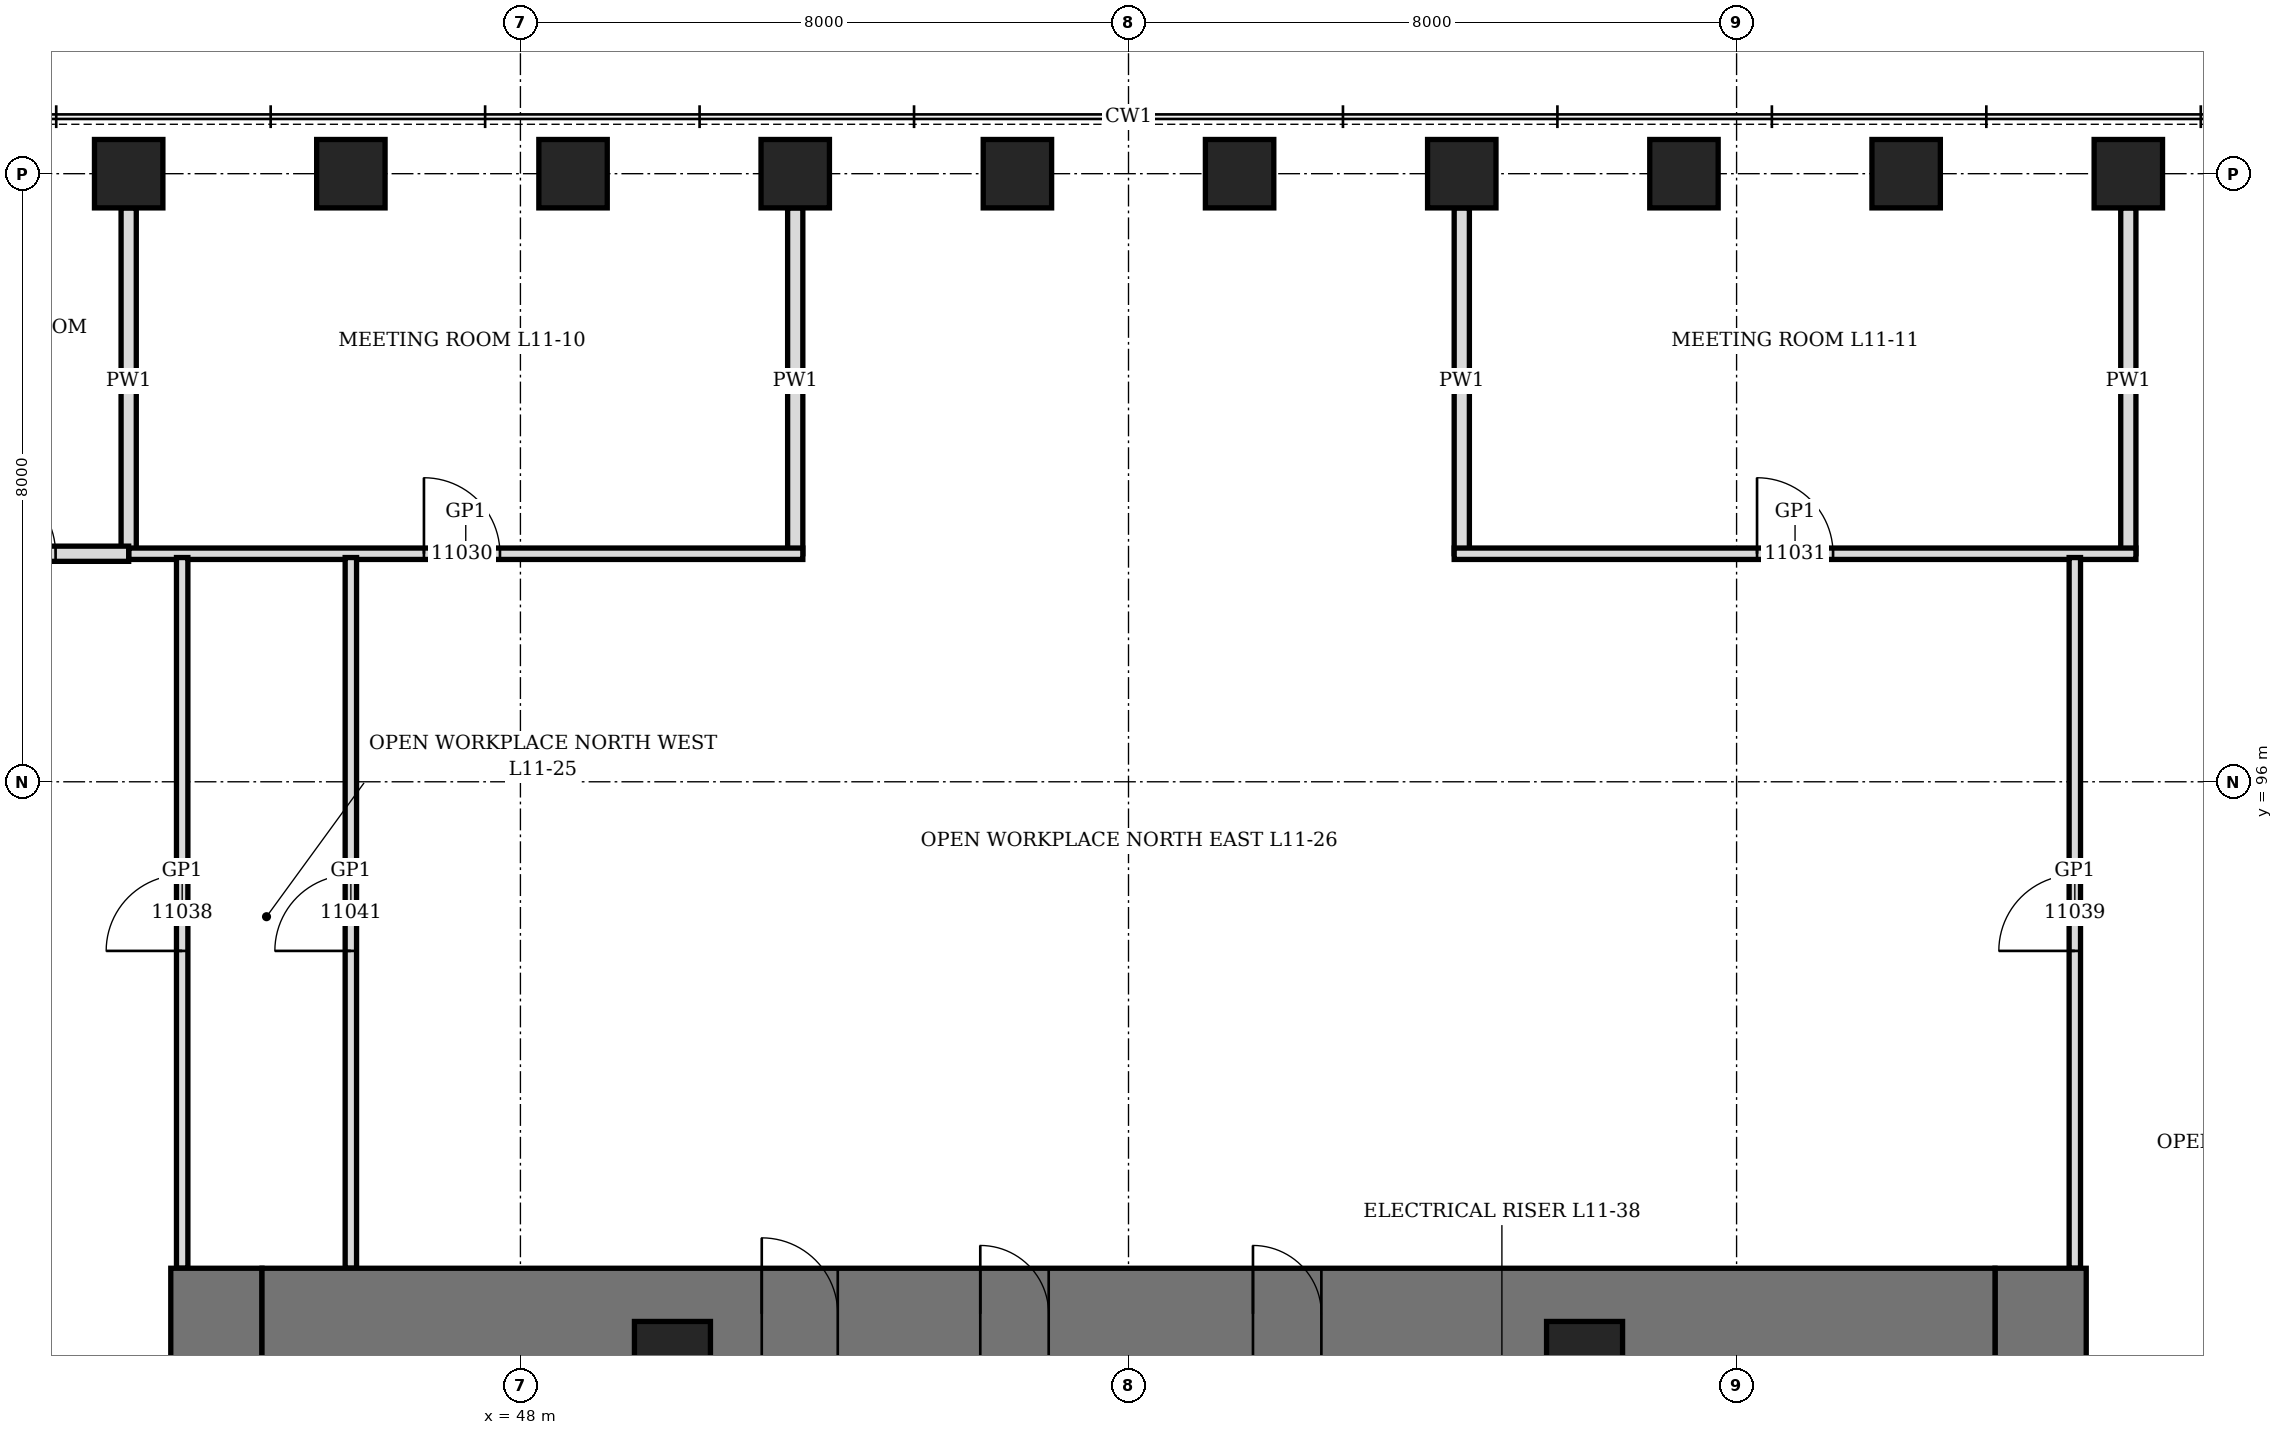
"""IFC4 building model, lengths in metres.
Left out: names, types, materials, properties, quantities, classifications, styles, units other than length and angle.
Written with IfcOpenShell. Run it as: python <this file> out.ifc"""

import sys

from ifc_helpers import new_model, si_unit, direction, frame, frame_2d, origin, origin_2d, place, context, subcontext, project, spatial, rectangle, hollow_rectangle, extrude, element, fill, save


model = new_model("IFC4")
c1 = context("Model", 3, precision=1e-05, world=origin(), true_north=direction((0.0, 1.0)))
c2 = subcontext(c1, "Body", "Model", "MODEL_VIEW")
j1 = project(units=[si_unit("LENGTHUNIT", "METRE"), si_unit("PLANEANGLEUNIT", "RADIAN")], contexts=[c1])
p1 = place(None, origin())
s1 = spatial("IfcSite", under=j1, at=p1, CompositionType="ELEMENT")
p2 = place(p1, origin())
s2 = spatial("IfcBuilding", under=s1, at=p2, CompositionType="ELEMENT")
p3 = place(p2, frame((0.0, 0.0, 55.9)))
s3 = spatial("IfcBuildingStorey", under=s2, at=p3, CompositionType="ELEMENT", Elevation=55.9)
for number, where, z_axis, x_axis in (
    (1, (69.154, 104.0, 0.0), (0.0, 0.0, 1.0), (1.0, 0.0, 0.0)),
    (2, (66.231, 104.0, 0.0), (0.0, 0.0, 1.0), (1.0, 0.0, 0.0)),
    (3, (63.308, 104.0, 0.0), (0.0, 0.0, 1.0), (1.0, 0.0, 0.0)),
    (4, (60.385, 104.0, 0.0), (0.0, 0.0, 1.0), (1.0, 0.0, 0.0)),
    (5, (57.461, 104.0, 0.0), (0.0, 0.0, 1.0), (1.0, 0.0, 0.0)),
    (6, (54.539, 104.0, 0.0), (0.0, 0.0, 1.0), (1.0, 0.0, 0.0)),
    (7, (51.615, 104.0, 0.0), (0.0, 0.0, 1.0), (1.0, 0.0, 0.0)),
    (8, (48.692, 104.0, 0.0), (0.0, 0.0, 1.0), (1.0, 0.0, 0.0)),
    (9, (45.769, 104.0, 0.0), (0.0, 0.0, 1.0), (1.0, 0.0, 0.0)),
    (10, (42.846, 104.0, 0.0), (0.0, 0.0, 1.0), (1.0, 0.0, 0.0)),
):
    element("IfcColumn", number, at=place(p3, frame(where, z_axis=z_axis, x_axis=x_axis)), inside=s3, PredefinedType="COLUMN", context=c2, shape_type="SweptSolid", body=[
        extrude(hollow_rectangle(XDim=0.9, YDim=0.9, WallThickness=0.12, at=origin_2d()), origin(), (0.0, 0.0, 1.0), 4.2),
    ])
p4 = place(p3, frame((44.0, 70.4, 0.0), z_axis=(0.0, 0.0, 1.0), x_axis=(0.0, 1.0, 0.0)))
e11 = element("IfcWall", 11, at=p4, inside=s3, PredefinedType="SHEAR", context=c2, shape_type="SweptSolid", body=[
    extrude(rectangle(XDim=19.2, YDim=1.2, at=frame_2d((9.6, 0.0))), origin(), (0.0, 0.0, 1.0), 4.2),
])
p5 = place(p4, frame((8.6, 0.0, 0.0)))
e12 = element("IfcOpeningElement", 12, at=p5, cuts=e11, PredefinedType="OPENING", context=c2, shape_type="SweptSolid", body=[
    extrude(rectangle(XDim=2.0, YDim=2.4, at=frame_2d((1.0, 1.2))), frame((0.0, 0.61, 0.0), z_axis=(0.0, -1.0, 0.0), x_axis=(1.0, 0.0, 0.0)), (0.0, 0.0, 1.0), 1.22),
])
p6 = place(p3, frame((68.0, 70.4, 0.0), z_axis=(0.0, 0.0, 1.0), x_axis=(0.0, 1.0, 0.0)))
e13 = element("IfcWall", 13, at=p6, inside=s3, PredefinedType="SHEAR", context=c2, shape_type="SweptSolid", body=[
    extrude(rectangle(XDim=19.2, YDim=1.2, at=frame_2d((9.6, 0.0))), origin(), (0.0, 0.0, 1.0), 4.2),
])
p7 = place(p6, frame((8.6, 0.0, 0.0)))
e14 = element("IfcOpeningElement", 14, at=p7, cuts=e13, PredefinedType="OPENING", context=c2, shape_type="SweptSolid", body=[
    extrude(rectangle(XDim=2.0, YDim=2.4, at=frame_2d((1.0, 1.2))), frame((0.0, 0.61, 0.0), z_axis=(0.0, -1.0, 0.0), x_axis=(1.0, 0.0, 0.0)), (0.0, 0.0, 1.0), 1.22),
])
p8 = place(p3, frame((44.6, 89.0, 0.0), z_axis=(0.0, 0.0, 1.0), x_axis=(1.0, 0.0, 0.0)))
e15 = element("IfcWall", 15, at=p8, inside=s3, PredefinedType="SHEAR", context=c2, shape_type="SweptSolid", body=[
    extrude(rectangle(XDim=22.8, YDim=1.2, at=frame_2d((11.4, 0.0))), origin(), (0.0, 0.0, 1.0), 4.2),
])
p9 = place(p8, frame((6.575, 0.0, 0.0)))
e16 = element("IfcOpeningElement", 16, at=p9, cuts=e15, PredefinedType="OPENING", context=c2, shape_type="SweptSolid", body=[
    extrude(rectangle(XDim=1.0, YDim=2.1, at=frame_2d((0.5, 1.05))), frame((0.0, 0.61, 0.0), z_axis=(0.0, -1.0, 0.0), x_axis=(1.0, 0.0, 0.0)), (0.0, 0.0, 1.0), 1.22),
])
p10 = place(p8, frame((9.45, 0.0, 0.0)))
e17 = element("IfcOpeningElement", 17, at=p10, cuts=e15, PredefinedType="OPENING", context=c2, shape_type="SweptSolid", body=[
    extrude(rectangle(XDim=0.9, YDim=2.1, at=frame_2d((0.45, 1.05))), frame((0.0, 0.61, 0.0), z_axis=(0.0, -1.0, 0.0), x_axis=(1.0, 0.0, 0.0)), (0.0, 0.0, 1.0), 1.22),
])
p11 = place(p8, frame((13.038, 0.0, 0.0)))
e18 = element("IfcOpeningElement", 18, at=p11, cuts=e15, PredefinedType="OPENING", context=c2, shape_type="SweptSolid", body=[
    extrude(rectangle(XDim=0.9, YDim=2.1, at=frame_2d((0.45, 1.05))), frame((0.0, 0.61, 0.0), z_axis=(0.0, -1.0, 0.0), x_axis=(1.0, 0.0, 0.0)), (0.0, 0.0, 1.0), 1.22),
])
for number, where, z_axis, x_axis in (
    (19, (50.0, 88.4, 0.0), (0.0, 0.0, 1.0), (1.0, 0.0, 0.0)),
    (20, (62.0, 88.4, 0.0), (0.0, 0.0, 1.0), (1.0, 0.0, 0.0)),
):
    element("IfcColumn", number, at=place(p3, frame(where, z_axis=z_axis, x_axis=x_axis)), inside=s3, PredefinedType="COLUMN", context=c2, shape_type="SweptSolid", body=[
        extrude(hollow_rectangle(XDim=1.0, YDim=1.0, WallThickness=0.15, at=origin_2d()), origin(), (0.0, 0.0, 1.0), 4.2),
    ])
for number, where, z_axis, x_axis in (
    (21, (42.846, 99.0, 0.0), (0.0, 0.0, 1.0), (0.0, 1.0, 0.0)),
    (22, (51.615, 99.0, 0.0), (0.0, 0.0, 1.0), (0.0, 1.0, 0.0)),
    (23, (60.385, 99.0, 0.0), (0.0, 0.0, 1.0), (0.0, 1.0, 0.0)),
    (24, (69.154, 99.0, 0.0), (0.0, 0.0, 1.0), (0.0, 1.0, 0.0)),
):
    element("IfcWall", number, at=place(p3, frame(where, z_axis=z_axis, x_axis=x_axis)), inside=s3, PredefinedType="PARTITIONING", context=c2, shape_type="SweptSolid", body=[
        extrude(rectangle(XDim=4.55, YDim=0.2, at=frame_2d((2.275, 0.0))), origin(), (0.0, 0.0, 1.0), 3.278),
    ])
p12 = place(p3, frame((42.846, 99.0, 0.0), z_axis=(0.0, 0.0, 1.0), x_axis=(1.0, 0.0, 0.0)))
e25 = element("IfcWall", 25, at=p12, inside=s3, PredefinedType="PARTITIONING", context=c2, shape_type="SweptSolid", body=[
    extrude(rectangle(XDim=8.869, YDim=0.15, at=frame_2d((4.435, 0.0))), origin(), (0.0, 0.0, 1.0), 4.04),
])
p13 = place(p12, frame((3.885, 0.0, 0.0)))
e26 = element("IfcOpeningElement", 26, at=p13, cuts=e25, PredefinedType="OPENING", context=c2, shape_type="SweptSolid", body=[
    extrude(rectangle(XDim=1.0, YDim=2.4, at=frame_2d((0.5, 1.2))), frame((0.0, 0.085, 0.0), z_axis=(0.0, -1.0, 0.0), x_axis=(1.0, 0.0, 0.0)), (0.0, 0.0, 1.0), 0.17),
])
p14 = place(p3, frame((60.285, 99.0, 0.0), z_axis=(0.0, 0.0, 1.0), x_axis=(1.0, 0.0, 0.0)))
e27 = element("IfcWall", 27, at=p14, inside=s3, PredefinedType="PARTITIONING", context=c2, shape_type="SweptSolid", body=[
    extrude(rectangle(XDim=8.969, YDim=0.15, at=frame_2d((4.485, 0.0))), origin(), (0.0, 0.0, 1.0), 4.04),
])
p15 = place(p14, frame((3.985, 0.0, 0.0)))
e28 = element("IfcOpeningElement", 28, at=p15, cuts=e27, PredefinedType="OPENING", context=c2, shape_type="SweptSolid", body=[
    extrude(rectangle(XDim=1.0, YDim=2.4, at=frame_2d((0.5, 1.2))), frame((0.0, 0.085, 0.0), z_axis=(0.0, -1.0, 0.0), x_axis=(1.0, 0.0, 0.0)), (0.0, 0.0, 1.0), 0.17),
])
p16 = place(p3, frame((39.923, 99.0, 0.0), z_axis=(0.0, 0.0, 1.0), x_axis=(1.0, 0.0, 0.0)))
e29 = element("IfcWall", 29, at=p16, inside=s3, PredefinedType="PARTITIONING", context=c2, shape_type="SweptSolid", body=[
    extrude(rectangle(XDim=2.923, YDim=0.2, at=frame_2d((1.461, 0.0))), origin(), (0.0, 0.0, 1.0), 4.04),
])
p17 = place(p16, frame((0.961, 0.0, 0.0)))
e30 = element("IfcOpeningElement", 30, at=p17, cuts=e29, PredefinedType="OPENING", context=c2, shape_type="SweptSolid", body=[
    extrude(rectangle(XDim=1.0, YDim=2.1, at=frame_2d((0.5, 1.05))), frame((0.0, 0.11, 0.0), z_axis=(0.0, -1.0, 0.0), x_axis=(1.0, 0.0, 0.0)), (0.0, 0.0, 1.0), 0.22),
])
p18 = place(p3, frame((43.55, 89.6, 0.0), z_axis=(0.0, 0.0, 1.0), x_axis=(0.0, 1.0, 0.0)))
e31 = element("IfcWall", 31, at=p18, inside=s3, PredefinedType="PARTITIONING", context=c2, shape_type="SweptSolid", body=[
    extrude(rectangle(XDim=9.35, YDim=0.15, at=frame_2d((4.675, 0.0))), origin(), (0.0, 0.0, 1.0), 4.04),
])
p19 = place(p18, frame((4.175, 0.0, 0.0)))
e32 = element("IfcOpeningElement", 32, at=p19, cuts=e31, PredefinedType="OPENING", context=c2, shape_type="SweptSolid", body=[
    extrude(rectangle(XDim=1.0, YDim=2.4, at=frame_2d((0.5, 1.2))), frame((0.0, 0.085, 0.0), z_axis=(0.0, -1.0, 0.0), x_axis=(1.0, 0.0, 0.0)), (0.0, 0.0, 1.0), 0.17),
])
p20 = place(p3, frame((45.769, 89.6, 0.0), z_axis=(0.0, 0.0, 1.0), x_axis=(0.0, 1.0, 0.0)))
e33 = element("IfcWall", 33, at=p20, inside=s3, PredefinedType="PARTITIONING", context=c2, shape_type="SweptSolid", body=[
    extrude(rectangle(XDim=9.35, YDim=0.15, at=frame_2d((4.675, 0.0))), origin(), (0.0, 0.0, 1.0), 3.278),
])
p21 = place(p20, frame((4.175, 0.0, 0.0)))
e34 = element("IfcOpeningElement", 34, at=p21, cuts=e33, PredefinedType="OPENING", context=c2, shape_type="SweptSolid", body=[
    extrude(rectangle(XDim=1.0, YDim=2.4, at=frame_2d((0.5, 1.2))), frame((0.0, 0.085, 0.0), z_axis=(0.0, -1.0, 0.0), x_axis=(1.0, 0.0, 0.0)), (0.0, 0.0, 1.0), 0.17),
])
p22 = place(p3, frame((68.45, 89.6, 0.0), z_axis=(0.0, 0.0, 1.0), x_axis=(0.0, 1.0, 0.0)))
e35 = element("IfcWall", 35, at=p22, inside=s3, PredefinedType="PARTITIONING", context=c2, shape_type="SweptSolid", body=[
    extrude(rectangle(XDim=9.35, YDim=0.15, at=frame_2d((4.675, 0.0))), origin(), (0.0, 0.0, 1.0), 4.04),
])
p23 = place(p22, frame((4.175, 0.0, 0.0)))
e36 = element("IfcOpeningElement", 36, at=p23, cuts=e35, PredefinedType="OPENING", context=c2, shape_type="SweptSolid", body=[
    extrude(rectangle(XDim=1.0, YDim=2.4, at=frame_2d((0.5, 1.2))), frame((0.0, 0.085, 0.0), z_axis=(0.0, -1.0, 0.0), x_axis=(1.0, 0.0, 0.0)), (0.0, 0.0, 1.0), 0.17),
])
p24 = place(p9, origin())
e37 = element("IfcDoor", 37, at=p24, inside=s3, OperationType="SINGLE_SWING_LEFT", PredefinedType="DOOR", context=c2, shape_type="SweptSolid", body=[
    extrude(rectangle(XDim=1.0, YDim=2.1, at=frame_2d((0.5, 1.05))), frame((0.0, 0.35, 0.0), z_axis=(0.0, -1.0, 0.0), x_axis=(1.0, 0.0, 0.0)), (0.0, 0.0, 1.0), 0.7),
])
fill(e16, e37)
p25 = place(p10, origin())
e38 = element("IfcDoor", 38, at=p25, inside=s3, OperationType="SINGLE_SWING_LEFT", PredefinedType="DOOR", context=c2, shape_type="SweptSolid", body=[
    extrude(rectangle(XDim=0.9, YDim=2.1, at=frame_2d((0.45, 1.05))), frame((0.0, 0.35, 0.0), z_axis=(0.0, -1.0, 0.0), x_axis=(1.0, 0.0, 0.0)), (0.0, 0.0, 1.0), 0.7),
])
fill(e17, e38)
p26 = place(p11, origin())
e39 = element("IfcDoor", 39, at=p26, inside=s3, OperationType="SINGLE_SWING_LEFT", PredefinedType="DOOR", context=c2, shape_type="SweptSolid", body=[
    extrude(rectangle(XDim=0.9, YDim=2.1, at=frame_2d((0.45, 1.05))), frame((0.0, 0.35, 0.0), z_axis=(0.0, -1.0, 0.0), x_axis=(1.0, 0.0, 0.0)), (0.0, 0.0, 1.0), 0.7),
])
fill(e18, e39)
p27 = place(p17, origin())
e40 = element("IfcDoor", 40, at=p27, inside=s3, OperationType="SINGLE_SWING_LEFT", PredefinedType="DOOR", context=c2, shape_type="SweptSolid", body=[
    extrude(rectangle(XDim=1.0, YDim=2.1, at=frame_2d((0.5, 1.05))), frame((0.0, 0.1, 0.0), z_axis=(0.0, -1.0, 0.0), x_axis=(1.0, 0.0, 0.0)), (0.0, 0.0, 1.0), 0.199),
])
fill(e30, e40)
p28 = place(p13, origin())
e41 = element("IfcDoor", 41, at=p28, inside=s3, OperationType="SINGLE_SWING_RIGHT", PredefinedType="DOOR", context=c2, shape_type="SweptSolid", body=[
    extrude(rectangle(XDim=1.0, YDim=2.4, at=frame_2d((0.5, 1.2))), frame((0.0, 0.075, 0.0), z_axis=(0.0, -1.0, 0.0), x_axis=(1.0, 0.0, 0.0)), (0.0, 0.0, 1.0), 0.149),
])
fill(e26, e41)
p29 = place(p15, origin())
e42 = element("IfcDoor", 42, at=p29, inside=s3, OperationType="SINGLE_SWING_RIGHT", PredefinedType="DOOR", context=c2, shape_type="SweptSolid", body=[
    extrude(rectangle(XDim=1.0, YDim=2.4, at=frame_2d((0.5, 1.2))), frame((0.0, 0.075, 0.0), z_axis=(0.0, -1.0, 0.0), x_axis=(1.0, 0.0, 0.0)), (0.0, 0.0, 1.0), 0.149),
])
fill(e28, e42)
p30 = place(p19, origin())
e43 = element("IfcDoor", 43, at=p30, inside=s3, OperationType="SINGLE_SWING_RIGHT", PredefinedType="DOOR", context=c2, shape_type="SweptSolid", body=[
    extrude(rectangle(XDim=1.0, YDim=2.4, at=frame_2d((0.5, 1.2))), frame((0.0, 0.075, 0.0), z_axis=(0.0, -1.0, 0.0), x_axis=(1.0, 0.0, 0.0)), (0.0, 0.0, 1.0), 0.149),
])
fill(e32, e43)
p31 = place(p23, origin())
e44 = element("IfcDoor", 44, at=p31, inside=s3, OperationType="SINGLE_SWING_RIGHT", PredefinedType="DOOR", context=c2, shape_type="SweptSolid", body=[
    extrude(rectangle(XDim=1.0, YDim=2.4, at=frame_2d((0.5, 1.2))), frame((0.0, 0.075, 0.0), z_axis=(0.0, -1.0, 0.0), x_axis=(1.0, 0.0, 0.0)), (0.0, 0.0, 1.0), 0.149),
])
fill(e36, e44)
p32 = place(p21, origin())
e45 = element("IfcDoor", 45, at=p32, inside=s3, OperationType="SINGLE_SWING_RIGHT", PredefinedType="DOOR", context=c2, shape_type="SweptSolid", body=[
    extrude(rectangle(XDim=1.0, YDim=2.4, at=frame_2d((0.5, 1.2))), frame((0.0, 0.075, 0.0), z_axis=(0.0, -1.0, 0.0), x_axis=(1.0, 0.0, 0.0)), (0.0, 0.0, 1.0), 0.149),
])
fill(e34, e45)
save(model, sys.argv[1])
